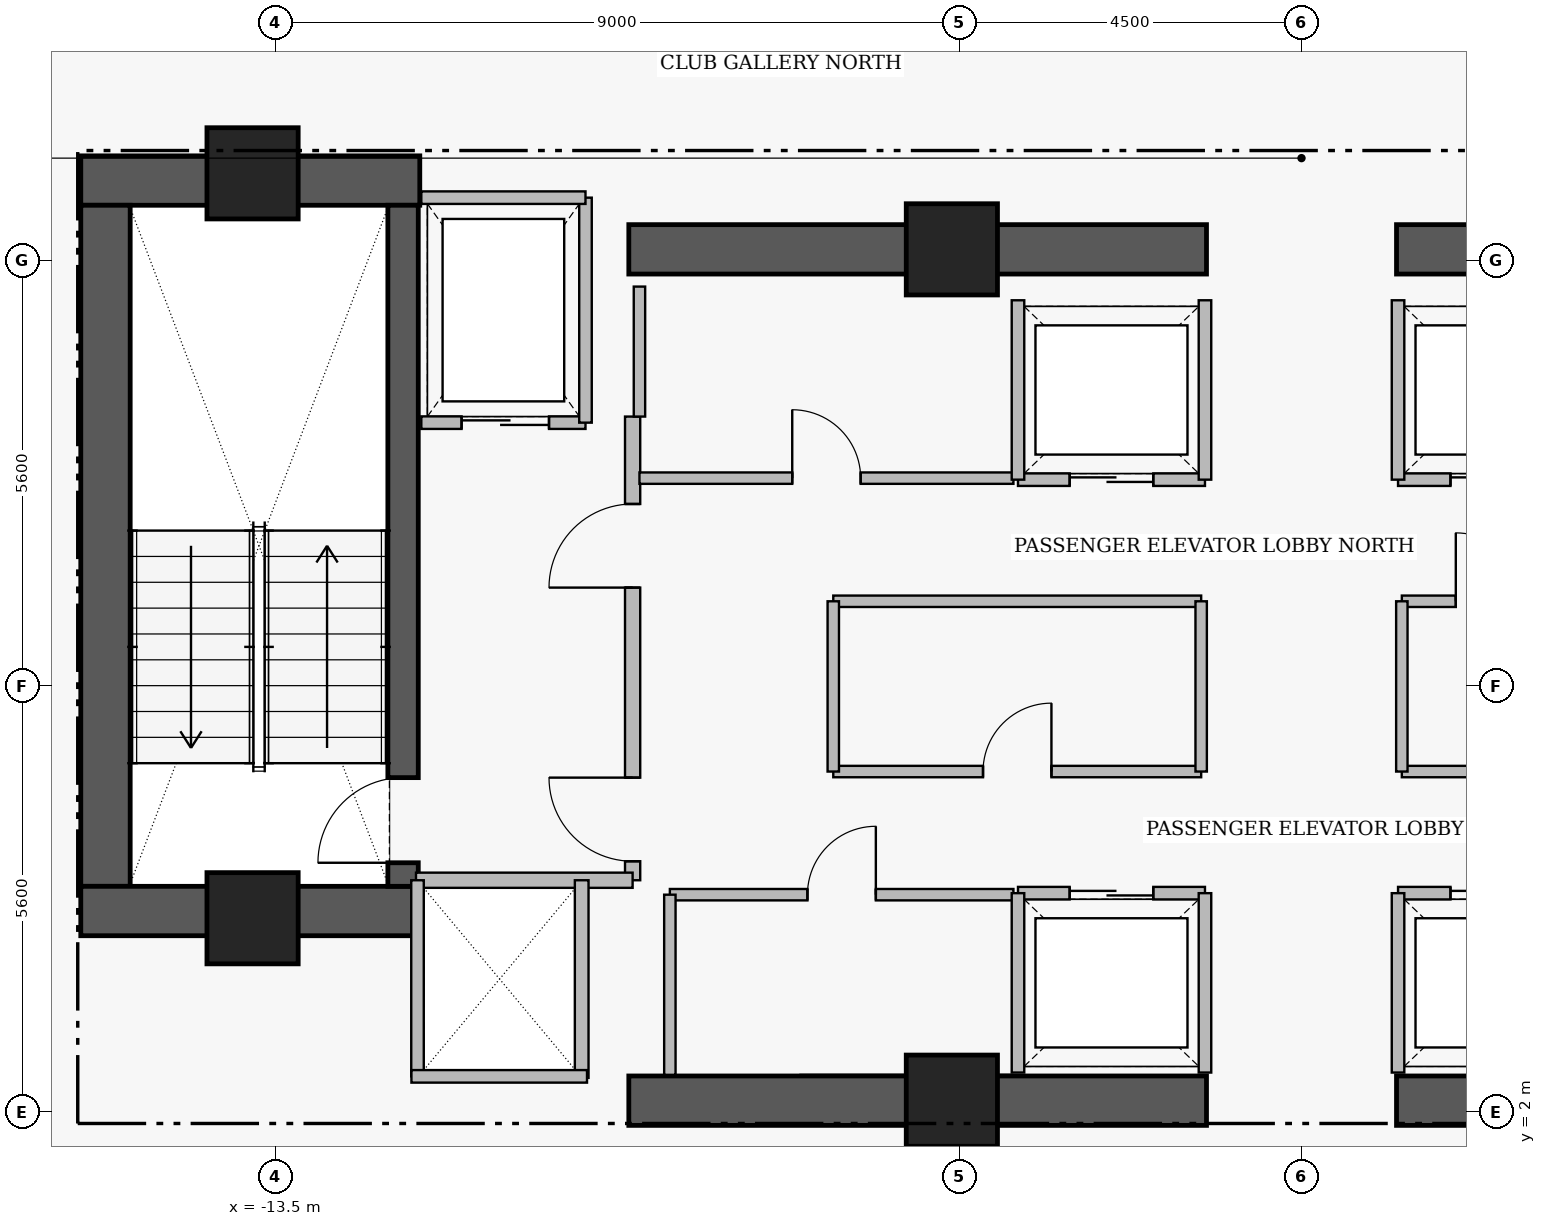
"""IFC4 building model, lengths in metres.
Left out: names, types, materials, properties, quantities, classifications, styles, units other than length and angle.
Written with IfcOpenShell. Run it as: python <this file> out.ifc"""

import sys

from ifc_helpers import new_model, si_unit, direction, frame, frame_2d, origin, origin_2d, place, context, subcontext, project, spatial, rectangle, extrude, element, fill, save


model = new_model("IFC4")
c1 = context("Model", 3, precision=1e-05, world=origin(), true_north=direction((0.0, 1.0)))
c2 = subcontext(c1, "Body", "Model", "MODEL_VIEW")
j1 = project(units=[si_unit("LENGTHUNIT", "METRE"), si_unit("PLANEANGLEUNIT", "RADIAN")], contexts=[c1])
p1 = place(None, origin())
s1 = spatial("IfcSite", under=j1, at=p1, CompositionType="ELEMENT")
p2 = place(p1, origin())
s2 = spatial("IfcBuilding", under=s1, at=p2, CompositionType="ELEMENT")
p3 = place(p2, frame((0.0, 0.0, 177.4)))
s3 = spatial("IfcBuildingStorey", under=s2, at=p3, CompositionType="ELEMENT", Elevation=177.4)
p4 = place(p3, frame((-16.06, 14.255, 0.0), z_axis=(0.0, 0.0, 1.0), x_axis=(1.0, 0.0, 0.0)))
e1 = element("IfcWall", 1, at=p4, inside=s3, PredefinedType="SHEAR", context=c2, shape_type="SweptSolid", body=[
    extrude(rectangle(XDim=4.46, YDim=0.65, at=frame_2d((2.23, 0.0))), origin(), (0.0, 0.0, 1.0), 3.56),
])
p5 = place(p3, frame((-15.735, 4.97, 0.0), z_axis=(0.0, 0.0, 1.0), x_axis=(0.0, 1.0, 0.0)))
e2 = element("IfcWall", 2, at=p5, inside=s3, PredefinedType="SHEAR", context=c2, shape_type="SweptSolid", body=[
    extrude(rectangle(XDim=8.96, YDim=0.65, at=frame_2d((4.48, 0.0))), origin(), (0.0, 0.0, 1.0), 3.56),
])
p6 = place(p3, frame((-16.06, 4.645, 0.0), z_axis=(0.0, 0.0, 1.0), x_axis=(1.0, 0.0, 0.0)))
e3 = element("IfcWall", 3, at=p6, inside=s3, PredefinedType="SHEAR", context=c2, shape_type="SweptSolid", body=[
    extrude(rectangle(XDim=4.46, YDim=0.65, at=frame_2d((2.23, 0.0))), origin(), (0.0, 0.0, 1.0), 3.56),
])
for number, where, z_axis, x_axis in (
    (4, (-8.85, 2.15, 0.0), (0.0, 0.0, 1.0), (1.0, 0.0, 0.0)),
    (5, (1.25, 2.15, 0.0), (0.0, 0.0, 1.0), (1.0, 0.0, 0.0)),
    (6, (-8.85, 13.35, 0.0), (0.0, 0.0, 1.0), (1.0, 0.0, 0.0)),
    (7, (1.25, 13.35, 0.0), (0.0, 0.0, 1.0), (1.0, 0.0, 0.0)),
):
    element("IfcWall", number, at=place(p3, frame(where, z_axis=z_axis, x_axis=x_axis)), inside=s3, PredefinedType="SHEAR", context=c2, shape_type="SweptSolid", body=[
        extrude(rectangle(XDim=7.6, YDim=0.65, at=frame_2d((3.8, 0.0))), origin(), (0.0, 0.0, 1.0), 3.53),
    ])
p7 = place(p3, frame((-11.82, 4.97, 0.0), z_axis=(0.0, 0.0, 1.0), x_axis=(0.0, 1.0, 0.0)))
e8 = element("IfcWall", 8, at=p7, inside=s3, PredefinedType="SHEAR", context=c2, shape_type="SweptSolid", body=[
    extrude(rectangle(XDim=8.96, YDim=0.4, at=frame_2d((4.48, 0.0))), origin(), (0.0, 0.0, 1.0), 3.56),
])
p8 = place(p7, frame((0.31, 0.0, 0.0)))
e9 = element("IfcOpeningElement", 9, at=p8, cuts=e8, PredefinedType="OPENING", context=c2, shape_type="SweptSolid", body=[
    extrude(rectangle(XDim=1.12, YDim=2.22, at=frame_2d((0.56, 1.11))), frame((0.0, 0.21, 0.0), z_axis=(0.0, -1.0, 0.0), x_axis=(1.0, 0.0, 0.0)), (0.0, 0.0, 1.0), 0.42),
])
for number, where, z_axis, x_axis in (
    (10, (-13.8, 14.35, 0.0), (0.0, 0.0, 1.0), (1.0, 0.0, 0.0)),
    (11, (-4.6, 13.35, 0.0), (0.0, 0.0, 1.0), (1.0, 0.0, 0.0)),
    (12, (-13.8, 4.55, 0.0), (0.0, 0.0, 1.0), (1.0, 0.0, 0.0)),
    (13, (-4.6, 2.15, 0.0), (0.0, 0.0, 1.0), (1.0, 0.0, 0.0)),
):
    element("IfcColumn", number, at=place(p3, frame(where, z_axis=z_axis, x_axis=x_axis)), inside=s3, PredefinedType="COLUMN", context=c2, shape_type="SweptSolid", body=[
        extrude(rectangle(XDim=1.2, YDim=1.2, at=origin_2d()), origin(), (0.0, 0.0, 1.0), 3.75),
    ])
p9 = place(p3, frame((-8.8, 5.05, 0.0), z_axis=(0.0, 0.0, 1.0), x_axis=(0.0, 1.0, 0.0)))
e14 = element("IfcWall", 14, at=p9, inside=s3, PredefinedType="PARTITIONING", context=c2, shape_type="SweptSolid", body=[
    extrude(rectangle(XDim=6.1, YDim=0.2, at=frame_2d((3.05, 0.0))), origin(), (0.0, 0.0, 1.0), 3.53),
])
p10 = place(p9, frame((0.25, 0.0, 0.0)))
e15 = element("IfcOpeningElement", 15, at=p10, cuts=e14, PredefinedType="OPENING", context=c2, shape_type="SweptSolid", body=[
    extrude(rectangle(XDim=1.1, YDim=2.2, at=frame_2d((0.55, 1.1))), frame((0.0, 0.11, 0.0), z_axis=(0.0, -1.0, 0.0), x_axis=(1.0, 0.0, 0.0)), (0.0, 0.0, 1.0), 0.22),
])
p11 = place(p9, frame((3.85, 0.0, 0.0)))
e16 = element("IfcOpeningElement", 16, at=p11, cuts=e14, PredefinedType="OPENING", context=c2, shape_type="SweptSolid", body=[
    extrude(rectangle(XDim=1.1, YDim=2.2, at=frame_2d((0.55, 1.1))), frame((0.0, 0.11, 0.0), z_axis=(0.0, -1.0, 0.0), x_axis=(1.0, 0.0, 0.0)), (0.0, 0.0, 1.0), 0.22),
])
p12 = place(p3, frame((-11.58, 11.07, 0.0), z_axis=(0.0, 0.0, 1.0), x_axis=(1.0, 0.0, 0.0)))
e17 = element("IfcWall", 17, at=p12, inside=s3, PredefinedType="PARTITIONING", context=c2, shape_type="SweptSolid", body=[
    extrude(rectangle(XDim=2.16, YDim=0.165, at=frame_2d((1.08, 0.0))), origin(), (0.0, 0.0, 1.0), 3.53),
])
p13 = place(p12, frame((0.53, 0.0, 0.0)))
e18 = element("IfcOpeningElement", 18, at=p13, cuts=e17, PredefinedType="OPENING", context=c2, shape_type="SweptSolid", body=[
    extrude(rectangle(XDim=1.15, YDim=2.25, at=frame_2d((0.575, 1.125))), frame((0.0, 0.093, 0.0), z_axis=(0.0, -1.0, 0.0), x_axis=(1.0, 0.0, 0.0)), (0.0, 0.0, 1.0), 0.185),
])
p14 = place(p3, frame((-3.73, 4.88, 0.0), z_axis=(0.0, 0.0, 1.0), x_axis=(1.0, 0.0, 0.0)))
e19 = element("IfcWall", 19, at=p14, inside=s3, PredefinedType="PARTITIONING", context=c2, shape_type="SweptSolid", body=[
    extrude(rectangle(XDim=2.46, YDim=0.165, at=frame_2d((1.23, 0.0))), origin(), (0.0, 0.0, 1.0), 3.53),
])
p15 = place(p14, frame((0.68, 0.0, 0.0)))
e20 = element("IfcOpeningElement", 20, at=p15, cuts=e19, PredefinedType="OPENING", context=c2, shape_type="SweptSolid", body=[
    extrude(rectangle(XDim=1.1, YDim=2.25, at=frame_2d((0.55, 1.125))), frame((0.0, 0.093, 0.0), z_axis=(0.0, -1.0, 0.0), x_axis=(1.0, 0.0, 0.0)), (0.0, 0.0, 1.0), 0.185),
])
p16 = place(p3, frame((1.27, 4.88, 0.0), z_axis=(0.0, 0.0, 1.0), x_axis=(1.0, 0.0, 0.0)))
e21 = element("IfcWall", 21, at=p16, inside=s3, PredefinedType="PARTITIONING", context=c2, shape_type="SweptSolid", body=[
    extrude(rectangle(XDim=2.48, YDim=0.165, at=frame_2d((1.24, 0.0))), origin(), (0.0, 0.0, 1.0), 3.53),
])
p17 = place(p16, frame((0.69, 0.0, 0.0)))
e22 = element("IfcOpeningElement", 22, at=p17, cuts=e21, PredefinedType="OPENING", context=c2, shape_type="SweptSolid", body=[
    extrude(rectangle(XDim=1.1, YDim=2.25, at=frame_2d((0.55, 1.125))), frame((0.0, 0.093, 0.0), z_axis=(0.0, -1.0, 0.0), x_axis=(1.0, 0.0, 0.0)), (0.0, 0.0, 1.0), 0.185),
])
p18 = place(p3, frame((-3.73, 10.32, 0.0), z_axis=(0.0, 0.0, 1.0), x_axis=(1.0, 0.0, 0.0)))
e23 = element("IfcWall", 23, at=p18, inside=s3, PredefinedType="PARTITIONING", context=c2, shape_type="SweptSolid", body=[
    extrude(rectangle(XDim=2.46, YDim=0.165, at=frame_2d((1.23, 0.0))), origin(), (0.0, 0.0, 1.0), 3.53),
])
p19 = place(p18, frame((0.68, 0.0, 0.0)))
e24 = element("IfcOpeningElement", 24, at=p19, cuts=e23, PredefinedType="OPENING", context=c2, shape_type="SweptSolid", body=[
    extrude(rectangle(XDim=1.1, YDim=2.25, at=frame_2d((0.55, 1.125))), frame((0.0, 0.093, 0.0), z_axis=(0.0, -1.0, 0.0), x_axis=(1.0, 0.0, 0.0)), (0.0, 0.0, 1.0), 0.185),
])
p20 = place(p3, frame((1.27, 10.32, 0.0), z_axis=(0.0, 0.0, 1.0), x_axis=(1.0, 0.0, 0.0)))
e25 = element("IfcWall", 25, at=p20, inside=s3, PredefinedType="PARTITIONING", context=c2, shape_type="SweptSolid", body=[
    extrude(rectangle(XDim=2.48, YDim=0.165, at=frame_2d((1.24, 0.0))), origin(), (0.0, 0.0, 1.0), 3.53),
])
p21 = place(p20, frame((0.69, 0.0, 0.0)))
e26 = element("IfcOpeningElement", 26, at=p21, cuts=e25, PredefinedType="OPENING", context=c2, shape_type="SweptSolid", body=[
    extrude(rectangle(XDim=1.1, YDim=2.25, at=frame_2d((0.55, 1.125))), frame((0.0, 0.093, 0.0), z_axis=(0.0, -1.0, 0.0), x_axis=(1.0, 0.0, 0.0)), (0.0, 0.0, 1.0), 0.185),
])
p22 = place(p3, frame((-8.31, 4.86, 0.0), z_axis=(0.0, 0.0, 1.0), x_axis=(1.0, 0.0, 0.0)))
e27 = element("IfcWall", 27, at=p22, inside=s3, PredefinedType="PARTITIONING", context=c2, shape_type="SweptSolid", body=[
    extrude(rectangle(XDim=4.52, YDim=0.15, at=frame_2d((2.26, 0.0))), origin(), (0.0, 0.0, 1.0), 3.53),
])
p23 = place(p22, frame((1.81, 0.0, 0.0)))
e28 = element("IfcOpeningElement", 28, at=p23, cuts=e27, PredefinedType="OPENING", context=c2, shape_type="SweptSolid", body=[
    extrude(rectangle(XDim=0.9, YDim=2.15, at=frame_2d((0.45, 1.075))), frame((0.0, 0.085, 0.0), z_axis=(0.0, -1.0, 0.0), x_axis=(1.0, 0.0, 0.0)), (0.0, 0.0, 1.0), 0.17),
])
p24 = place(p3, frame((-8.71, 10.34, 0.0), z_axis=(0.0, 0.0, 1.0), x_axis=(1.0, 0.0, 0.0)))
e29 = element("IfcWall", 29, at=p24, inside=s3, PredefinedType="PARTITIONING", context=c2, shape_type="SweptSolid", body=[
    extrude(rectangle(XDim=4.92, YDim=0.15, at=frame_2d((2.46, 0.0))), origin(), (0.0, 0.0, 1.0), 3.53),
])
p25 = place(p24, frame((2.01, 0.0, 0.0)))
e30 = element("IfcOpeningElement", 30, at=p25, cuts=e29, PredefinedType="OPENING", context=c2, shape_type="SweptSolid", body=[
    extrude(rectangle(XDim=0.9, YDim=2.15, at=frame_2d((0.45, 1.075))), frame((0.0, 0.085, 0.0), z_axis=(0.0, -1.0, 0.0), x_axis=(1.0, 0.0, 0.0)), (0.0, 0.0, 1.0), 0.17),
])
p26 = place(p3, frame((-6.16, 6.48, 0.0), z_axis=(0.0, 0.0, 1.0), x_axis=(1.0, 0.0, 0.0)))
e31 = element("IfcWall", 31, at=p26, inside=s3, PredefinedType="PARTITIONING", context=c2, shape_type="SweptSolid", body=[
    extrude(rectangle(XDim=4.84, YDim=0.15, at=frame_2d((2.42, 0.0))), origin(), (0.0, 0.0, 1.0), 3.53),
])
p27 = place(p26, frame((1.97, 0.0, 0.0)))
e32 = element("IfcOpeningElement", 32, at=p27, cuts=e31, PredefinedType="OPENING", context=c2, shape_type="SweptSolid", body=[
    extrude(rectangle(XDim=0.9, YDim=2.15, at=frame_2d((0.45, 1.075))), frame((0.0, 0.085, 0.0), z_axis=(0.0, -1.0, 0.0), x_axis=(1.0, 0.0, 0.0)), (0.0, 0.0, 1.0), 0.17),
])
p28 = place(p3, frame((1.32, 8.72, 0.0), z_axis=(0.0, 0.0, 1.0), x_axis=(1.0, 0.0, 0.0)))
e33 = element("IfcWall", 33, at=p28, inside=s3, PredefinedType="PARTITIONING", context=c2, shape_type="SweptSolid", body=[
    extrude(rectangle(XDim=2.32, YDim=0.15, at=frame_2d((1.16, 0.0))), origin(), (0.0, 0.0, 1.0), 3.53),
])
p29 = place(p28, frame((0.71, 0.0, 0.0)))
e34 = element("IfcOpeningElement", 34, at=p29, cuts=e33, PredefinedType="OPENING", context=c2, shape_type="SweptSolid", body=[
    extrude(rectangle(XDim=0.9, YDim=2.15, at=frame_2d((0.45, 1.075))), frame((0.0, 0.085, 0.0), z_axis=(0.0, -1.0, 0.0), x_axis=(1.0, 0.0, 0.0)), (0.0, 0.0, 1.0), 0.17),
])
p30 = place(p3, frame((-11.65, 5.05, 0.0), z_axis=(0.0, 0.0, 1.0), x_axis=(1.0, 0.0, 0.0)))
e35 = element("IfcWall", 35, at=p30, inside=s3, PredefinedType="PARTITIONING", context=c2, shape_type="SweptSolid", body=[
    extrude(rectangle(XDim=2.85, YDim=0.2, at=frame_2d((1.425, 0.0))), origin(), (0.0, 0.0, 1.0), 3.53),
])
p31 = place(p3, frame((-9.42, 11.07, 0.0), z_axis=(0.0, 0.0, 1.0), x_axis=(0.0, 1.0, 0.0)))
e36 = element("IfcWall", 36, at=p31, inside=s3, PredefinedType="PARTITIONING", context=c2, shape_type="SweptSolid", body=[
    extrude(rectangle(XDim=2.96, YDim=0.165, at=frame_2d((1.48, 0.0))), origin(), (0.0, 0.0, 1.0), 3.53),
])
p32 = place(p3, frame((-11.58, 14.03, 0.0), z_axis=(0.0, 0.0, 1.0), x_axis=(1.0, 0.0, 0.0)))
e37 = element("IfcWall", 37, at=p32, inside=s3, PredefinedType="PARTITIONING", context=c2, shape_type="SweptSolid", body=[
    extrude(rectangle(XDim=2.16, YDim=0.165, at=frame_2d((1.08, 0.0))), origin(), (0.0, 0.0, 1.0), 3.53),
])
for number, where, z_axis, x_axis in (
    (38, (-3.73, 2.52, 0.0), (0.0, 0.0, 1.0), (0.0, 1.0, 0.0)),
    (39, (-1.27, 2.52, 0.0), (0.0, 0.0, 1.0), (0.0, 1.0, 0.0)),
    (40, (1.27, 2.52, 0.0), (0.0, 0.0, 1.0), (0.0, 1.0, 0.0)),
    (41, (-3.73, 10.32, 0.0), (0.0, 0.0, 1.0), (0.0, 1.0, 0.0)),
    (42, (-1.27, 10.32, 0.0), (0.0, 0.0, 1.0), (0.0, 1.0, 0.0)),
    (43, (1.27, 10.32, 0.0), (0.0, 0.0, 1.0), (0.0, 1.0, 0.0)),
):
    element("IfcWall", number, at=place(p3, frame(where, z_axis=z_axis, x_axis=x_axis)), inside=s3, PredefinedType="PARTITIONING", context=c2, shape_type="SweptSolid", body=[
        extrude(rectangle(XDim=2.36, YDim=0.165, at=frame_2d((1.18, 0.0))), origin(), (0.0, 0.0, 1.0), 3.53),
    ])
p33 = place(p3, frame((-8.31, 2.49, 0.0), z_axis=(0.0, 0.0, 1.0), x_axis=(0.0, 1.0, 0.0)))
e44 = element("IfcWall", 44, at=p33, inside=s3, PredefinedType="PARTITIONING", context=c2, shape_type="SweptSolid", body=[
    extrude(rectangle(XDim=2.37, YDim=0.15, at=frame_2d((1.185, 0.0))), origin(), (0.0, 0.0, 1.0), 3.53),
])
p34 = place(p3, frame((-8.71, 11.15, 0.0), z_axis=(0.0, 0.0, 1.0), x_axis=(0.0, 1.0, 0.0)))
e45 = element("IfcWall", 45, at=p34, inside=s3, PredefinedType="PARTITIONING", context=c2, shape_type="SweptSolid", body=[
    extrude(rectangle(XDim=1.71, YDim=0.15, at=frame_2d((0.855, 0.0))), origin(), (0.0, 0.0, 1.0), 3.53),
])
p35 = place(p3, frame((-9.47, 2.45, 0.0), z_axis=(0.0, 0.0, 1.0), x_axis=(0.0, 1.0, 0.0)))
e46 = element("IfcWall", 46, at=p35, inside=s3, PredefinedType="PARTITIONING", context=c2, shape_type="SweptSolid", body=[
    extrude(rectangle(XDim=2.6, YDim=0.18, at=frame_2d((1.3, 0.0))), origin(), (0.0, 0.0, 1.0), 3.53),
])
p36 = place(p3, frame((-11.63, 2.47, 0.0), z_axis=(0.0, 0.0, 1.0), x_axis=(0.0, 1.0, 0.0)))
e47 = element("IfcWall", 47, at=p36, inside=s3, PredefinedType="PARTITIONING", context=c2, shape_type="SweptSolid", body=[
    extrude(rectangle(XDim=2.58, YDim=0.165, at=frame_2d((1.29, 0.0))), origin(), (0.0, 0.0, 1.0), 3.53),
])
p37 = place(p3, frame((-11.71, 2.47, 0.0), z_axis=(0.0, 0.0, 1.0), x_axis=(1.0, 0.0, 0.0)))
e48 = element("IfcWall", 48, at=p37, inside=s3, PredefinedType="PARTITIONING", context=c2, shape_type="SweptSolid", body=[
    extrude(rectangle(XDim=2.31, YDim=0.165, at=frame_2d((1.155, 0.0))), origin(), (0.0, 0.0, 1.0), 2.43),
])
p38 = place(p3, frame((-6.16, 8.72, 0.0), z_axis=(0.0, 0.0, 1.0), x_axis=(1.0, 0.0, 0.0)))
e49 = element("IfcWall", 49, at=p38, inside=s3, PredefinedType="PARTITIONING", context=c2, shape_type="SweptSolid", body=[
    extrude(rectangle(XDim=4.84, YDim=0.15, at=frame_2d((2.42, 0.0))), origin(), (0.0, 0.0, 1.0), 3.53),
])
for number, where, z_axis, x_axis in (
    (50, (-6.16, 6.48, 0.0), (0.0, 0.0, 1.0), (0.0, 1.0, 0.0)),
    (51, (-1.32, 6.48, 0.0), (0.0, 0.0, 1.0), (0.0, 1.0, 0.0)),
):
    element("IfcWall", number, at=place(p3, frame(where, z_axis=z_axis, x_axis=x_axis)), inside=s3, PredefinedType="PARTITIONING", context=c2, shape_type="SweptSolid", body=[
        extrude(rectangle(XDim=2.24, YDim=0.15, at=frame_2d((1.12, 0.0))), origin(), (0.0, 0.0, 1.0), 3.53),
    ])
p39 = place(p3, frame((1.32, 6.48, 0.0), z_axis=(0.0, 0.0, 1.0), x_axis=(1.0, 0.0, 0.0)))
e52 = element("IfcWall", 52, at=p39, inside=s3, PredefinedType="PARTITIONING", context=c2, shape_type="SweptSolid", body=[
    extrude(rectangle(XDim=2.32, YDim=0.15, at=frame_2d((1.16, 0.0))), origin(), (0.0, 0.0, 1.0), 3.53),
])
p40 = place(p3, frame((1.32, 6.48, 0.0), z_axis=(0.0, 0.0, 1.0), x_axis=(0.0, 1.0, 0.0)))
e53 = element("IfcWall", 53, at=p40, inside=s3, PredefinedType="PARTITIONING", context=c2, shape_type="SweptSolid", body=[
    extrude(rectangle(XDim=2.24, YDim=0.15, at=frame_2d((1.12, 0.0))), origin(), (0.0, 0.0, 1.0), 3.53),
])
p41 = place(p8, origin())
e54 = element("IfcDoor", 54, at=p41, inside=s3, OperationType="SINGLE_SWING_LEFT", PredefinedType="DOOR", context=c2, shape_type="SweptSolid", body=[
    extrude(rectangle(XDim=1.12, YDim=2.22, at=frame_2d((0.56, 1.11))), frame((0.0, 0.025, 0.0), z_axis=(0.0, -1.0, 0.0), x_axis=(1.0, 0.0, 0.0)), (0.0, 0.0, 1.0), 0.05),
])
fill(e9, e54)
p42 = place(p10, origin())
e55 = element("IfcDoor", 55, at=p42, inside=s3, OperationType="SINGLE_SWING_RIGHT", PredefinedType="DOOR", context=c2, shape_type="SweptSolid", body=[
    extrude(rectangle(XDim=1.1, YDim=2.2, at=frame_2d((0.55, 1.1))), frame((0.0, 0.025, 0.0), z_axis=(0.0, -1.0, 0.0), x_axis=(1.0, 0.0, 0.0)), (0.0, 0.0, 1.0), 0.05),
])
fill(e15, e55)
p43 = place(p11, origin())
e56 = element("IfcDoor", 56, at=p43, inside=s3, OperationType="SINGLE_SWING_LEFT", PredefinedType="DOOR", context=c2, shape_type="SweptSolid", body=[
    extrude(rectangle(XDim=1.1, YDim=2.2, at=frame_2d((0.55, 1.1))), frame((0.0, 0.025, 0.0), z_axis=(0.0, -1.0, 0.0), x_axis=(1.0, 0.0, 0.0)), (0.0, 0.0, 1.0), 0.05),
])
fill(e16, e56)
p44 = place(p13, origin())
e57 = element("IfcDoor", 57, at=p44, inside=s3, OperationType="SLIDING_TO_LEFT", PredefinedType="DOOR", context=c2, shape_type="SweptSolid", body=[
    extrude(rectangle(XDim=1.15, YDim=2.25, at=frame_2d((0.575, 1.125))), frame((0.0, 0.025, 0.0), z_axis=(0.0, -1.0, 0.0), x_axis=(1.0, 0.0, 0.0)), (0.0, 0.0, 1.0), 0.05),
])
fill(e18, e57)
p45 = place(p15, origin())
e58 = element("IfcDoor", 58, at=p45, inside=s3, OperationType="SLIDING_TO_LEFT", PredefinedType="DOOR", context=c2, shape_type="SweptSolid", body=[
    extrude(rectangle(XDim=1.1, YDim=2.25, at=frame_2d((0.55, 1.125))), frame((0.0, 0.025, 0.0), z_axis=(0.0, -1.0, 0.0), x_axis=(1.0, 0.0, 0.0)), (0.0, 0.0, 1.0), 0.05),
])
fill(e20, e58)
p46 = place(p17, origin())
e59 = element("IfcDoor", 59, at=p46, inside=s3, OperationType="SLIDING_TO_LEFT", PredefinedType="DOOR", context=c2, shape_type="SweptSolid", body=[
    extrude(rectangle(XDim=1.1, YDim=2.25, at=frame_2d((0.55, 1.125))), frame((0.0, 0.025, 0.0), z_axis=(0.0, -1.0, 0.0), x_axis=(1.0, 0.0, 0.0)), (0.0, 0.0, 1.0), 0.05),
])
fill(e22, e59)
p47 = place(p19, origin())
e60 = element("IfcDoor", 60, at=p47, inside=s3, OperationType="SLIDING_TO_LEFT", PredefinedType="DOOR", context=c2, shape_type="SweptSolid", body=[
    extrude(rectangle(XDim=1.1, YDim=2.25, at=frame_2d((0.55, 1.125))), frame((0.0, 0.025, 0.0), z_axis=(0.0, -1.0, 0.0), x_axis=(1.0, 0.0, 0.0)), (0.0, 0.0, 1.0), 0.05),
])
fill(e24, e60)
p48 = place(p21, origin())
e61 = element("IfcDoor", 61, at=p48, inside=s3, OperationType="SLIDING_TO_LEFT", PredefinedType="DOOR", context=c2, shape_type="SweptSolid", body=[
    extrude(rectangle(XDim=1.1, YDim=2.25, at=frame_2d((0.55, 1.125))), frame((0.0, 0.025, 0.0), z_axis=(0.0, -1.0, 0.0), x_axis=(1.0, 0.0, 0.0)), (0.0, 0.0, 1.0), 0.05),
])
fill(e26, e61)
p49 = place(p23, origin())
e62 = element("IfcDoor", 62, at=p49, inside=s3, OperationType="SINGLE_SWING_RIGHT", PredefinedType="DOOR", context=c2, shape_type="SweptSolid", body=[
    extrude(rectangle(XDim=0.9, YDim=2.15, at=frame_2d((0.45, 1.075))), frame((0.0, 0.025, 0.0), z_axis=(0.0, -1.0, 0.0), x_axis=(1.0, 0.0, 0.0)), (0.0, 0.0, 1.0), 0.05),
])
fill(e28, e62)
p50 = place(p25, origin())
e63 = element("IfcDoor", 63, at=p50, inside=s3, OperationType="SINGLE_SWING_LEFT", PredefinedType="DOOR", context=c2, shape_type="SweptSolid", body=[
    extrude(rectangle(XDim=0.9, YDim=2.15, at=frame_2d((0.45, 1.075))), frame((0.0, 0.025, 0.0), z_axis=(0.0, -1.0, 0.0), x_axis=(1.0, 0.0, 0.0)), (0.0, 0.0, 1.0), 0.05),
])
fill(e30, e63)
p51 = place(p27, origin())
e64 = element("IfcDoor", 64, at=p51, inside=s3, OperationType="SINGLE_SWING_RIGHT", PredefinedType="DOOR", context=c2, shape_type="SweptSolid", body=[
    extrude(rectangle(XDim=0.9, YDim=2.15, at=frame_2d((0.45, 1.075))), frame((0.0, 0.025, 0.0), z_axis=(0.0, -1.0, 0.0), x_axis=(1.0, 0.0, 0.0)), (0.0, 0.0, 1.0), 0.05),
])
fill(e32, e64)
p52 = place(p29, origin())
e65 = element("IfcDoor", 65, at=p52, inside=s3, OperationType="SINGLE_SWING_LEFT", PredefinedType="DOOR", context=c2, shape_type="SweptSolid", body=[
    extrude(rectangle(XDim=0.9, YDim=2.15, at=frame_2d((0.45, 1.075))), frame((0.0, 0.025, 0.0), z_axis=(0.0, -1.0, 0.0), x_axis=(1.0, 0.0, 0.0)), (0.0, 0.0, 1.0), 0.05),
])
fill(e34, e65)
save(model, sys.argv[1])
